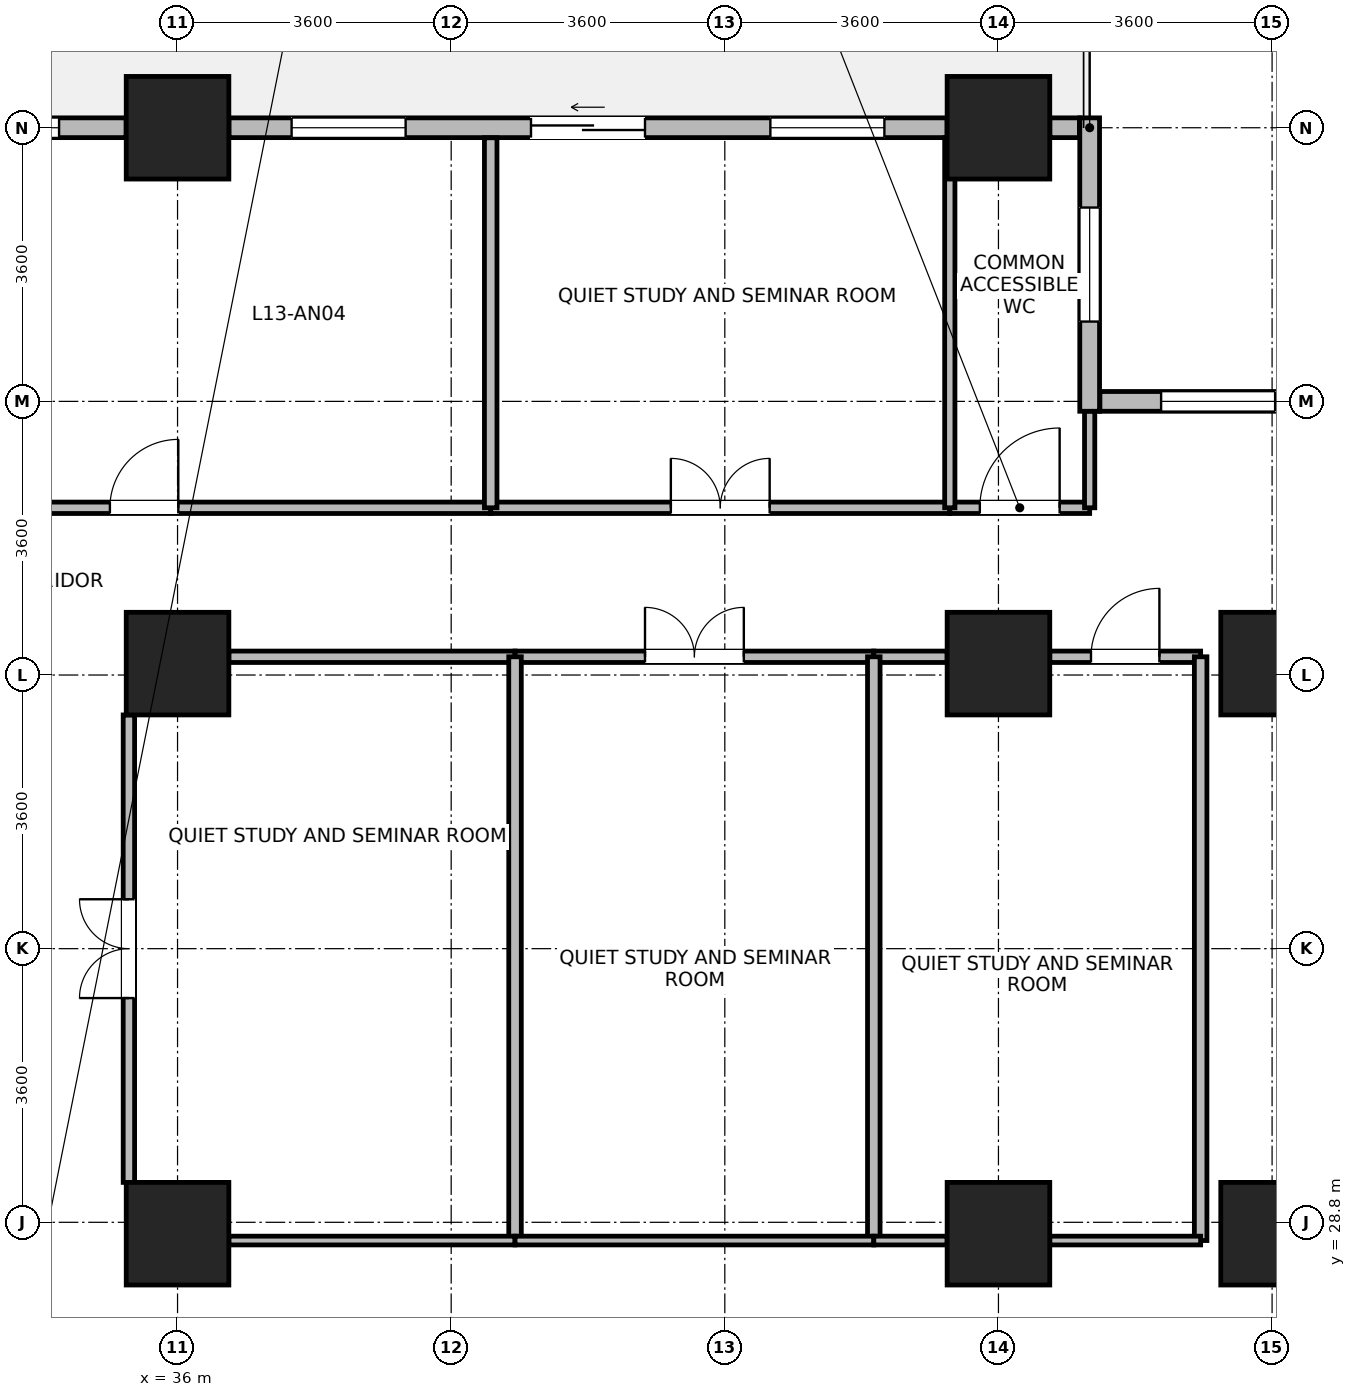
"""IFC4 building model, lengths in metres.
Left out: names, types, materials, properties, quantities, classifications, styles, units other than length and angle.
Written with IfcOpenShell. Run it as: python <this file> out.ifc"""

import sys

from ifc_helpers import new_model, si_unit, direction, frame, frame_2d, origin, origin_2d, place, context, subcontext, project, spatial, rectangle, extrude, source, transform, mapped, element, fill, save


model = new_model("IFC4")
c1 = context("Model", 3, precision=1e-05, world=origin(), true_north=direction((0.0, 1.0)))
c2 = subcontext(c1, "Body", "Model", "MODEL_VIEW")
j1 = project(units=[si_unit("LENGTHUNIT", "METRE"), si_unit("PLANEANGLEUNIT", "RADIAN")], contexts=[c1])
p1 = place(None, origin())
s1 = spatial("IfcSite", under=j1, at=p1, CompositionType="ELEMENT")
p2 = place(p1, origin())
s2 = spatial("IfcBuilding", under=s1, at=p2, CompositionType="ELEMENT")
p3 = place(p2, frame((0.0, 0.0, 54.9)))
s3 = spatial("IfcBuildingStorey", under=s2, at=p3, CompositionType="ELEMENT", Elevation=54.9)
m1 = source(origin(), c2, "Body", "SweptSolid", [
    extrude(rectangle(XDim=1.35, YDim=1.35, at=origin_2d()), origin(), (0.0, 0.0, 1.0), 3.7),
])
for number, where, z_axis, x_axis in (
    (1, (36.0, 43.2, 0.0), (0.0, 0.0, 1.0), (1.0, 0.0, 0.0)),
    (2, (36.0, 28.65, 0.0), (0.0, 0.0, 1.0), (1.0, 0.0, 0.0)),
    (3, (36.0, 36.15, 0.0), (0.0, 0.0, 1.0), (1.0, 0.0, 0.0)),
    (4, (46.8, 28.65, 0.0), (0.0, 0.0, 1.0), (1.0, 0.0, 0.0)),
    (5, (46.8, 36.15, 0.0), (0.0, 0.0, 1.0), (1.0, 0.0, 0.0)),
    (6, (46.8, 43.2, 0.0), (0.0, 0.0, 1.0), (1.0, 0.0, 0.0)),
    (7, (50.4, 28.65, 0.0), (0.0, 0.0, 1.0), (1.0, 0.0, 0.0)),
    (8, (50.4, 36.15, 0.0), (0.0, 0.0, 1.0), (1.0, 0.0, 0.0)),
):
    element("IfcColumn", number, at=place(p3, frame(where, z_axis=z_axis, x_axis=x_axis)), inside=s3, PredefinedType="COLUMN", context=c2, shape_type="MappedRepresentation", body=[
        mapped(m1, transform((0.0, 0.0, 0.0), x_axis=(1.0, 0.0, 0.0), y_axis=(0.0, 1.0, 0.0), z_axis=(0.0, 0.0, 1.0), scale=1.0)),
    ])
p4 = place(p3, frame((48.135, 39.6, 0.0), z_axis=(0.0, 0.0, 1.0), x_axis=(1.0, 0.0, 0.0)))
e9 = element("IfcWall", 9, at=p4, inside=s3, PredefinedType="STANDARD", context=c2, shape_type="SweptSolid", body=[
    extrude(rectangle(XDim=9.33, YDim=0.26, at=frame_2d((4.665, 0.0))), origin(), (0.0, 0.0, 1.0), 3.43),
])
p5 = place(p4, frame((0.805, 0.0, 0.85)))
e10 = element("IfcOpeningElement", 10, at=p5, cuts=e9, PredefinedType="OPENING", context=c2, shape_type="SweptSolid", body=[
    extrude(rectangle(XDim=1.5, YDim=1.85, at=frame_2d((0.75, 0.925))), frame((0.0, 0.14, 0.0), z_axis=(0.0, -1.0, 0.0), x_axis=(1.0, 0.0, 0.0)), (0.0, 0.0, 1.0), 0.28),
])
p6 = place(p4, frame((3.915, 0.0, 0.85)))
e11 = element("IfcOpeningElement", 11, at=p6, cuts=e9, PredefinedType="OPENING", context=c2, shape_type="SweptSolid", body=[
    extrude(rectangle(XDim=1.5, YDim=1.85, at=frame_2d((0.75, 0.925))), frame((0.0, 0.14, 0.0), z_axis=(0.0, -1.0, 0.0), x_axis=(1.0, 0.0, 0.0)), (0.0, 0.0, 1.0), 0.28),
])
p7 = place(p4, frame((7.025, 0.0, 0.85)))
e12 = element("IfcOpeningElement", 12, at=p7, cuts=e9, PredefinedType="OPENING", context=c2, shape_type="SweptSolid", body=[
    extrude(rectangle(XDim=1.5, YDim=1.85, at=frame_2d((0.75, 0.925))), frame((0.0, 0.14, 0.0), z_axis=(0.0, -1.0, 0.0), x_axis=(1.0, 0.0, 0.0)), (0.0, 0.0, 1.0), 0.28),
])
p8 = place(p3, frame((48.0, 43.33, 0.0), z_axis=(0.0, 0.0, 1.0), x_axis=(0.0, -1.0, 0.0)))
e13 = element("IfcWall", 13, at=p8, inside=s3, PredefinedType="STANDARD", context=c2, shape_type="SweptSolid", body=[
    extrude(rectangle(XDim=3.86, YDim=0.26, at=frame_2d((1.93, 0.0))), origin(), (0.0, 0.0, 1.0), 3.43),
])
p9 = place(p8, frame((1.18, 0.0, 0.85)))
e14 = element("IfcOpeningElement", 14, at=p9, cuts=e13, PredefinedType="OPENING", context=c2, shape_type="SweptSolid", body=[
    extrude(rectangle(XDim=1.5, YDim=1.85, at=frame_2d((0.75, 0.925))), frame((0.0, 0.14, 0.0), z_axis=(0.0, -1.0, 0.0), x_axis=(1.0, 0.0, 0.0)), (0.0, 0.0, 1.0), 0.28),
])
p10 = place(p3, frame((47.476, 43.2, 0.0), z_axis=(0.0, 0.0, 1.0), x_axis=(1.0, 0.0, 0.0)))
e15 = element("IfcWall", 15, at=p10, inside=s3, PredefinedType="STANDARD", context=c2, shape_type="SweptSolid", body=[
    extrude(rectangle(XDim=0.389, YDim=0.26, at=frame_2d((0.194, 0.0))), origin(), (0.0, 0.0, 1.0), 3.43),
])
p11 = place(p3, frame((36.676, 43.2, 0.0), z_axis=(0.0, 0.0, 1.0), x_axis=(1.0, 0.0, 0.0)))
e16 = element("IfcWall", 16, at=p11, inside=s3, PredefinedType="STANDARD", context=c2, shape_type="SweptSolid", body=[
    extrude(rectangle(XDim=9.448, YDim=0.26, at=frame_2d((4.724, 0.0))), origin(), (0.0, 0.0, 1.0), 2.93),
])
p12 = place(p11, frame((3.974, 0.0, 0.0)))
e17 = element("IfcOpeningElement", 17, at=p12, cuts=e16, PredefinedType="OPENING", context=c2, shape_type="SweptSolid", body=[
    extrude(rectangle(XDim=1.5, YDim=2.15, at=frame_2d((0.75, 1.075))), frame((0.0, 0.14, 0.0), z_axis=(0.0, -1.0, 0.0), x_axis=(1.0, 0.0, 0.0)), (0.0, 0.0, 1.0), 0.28),
])
p13 = place(p11, frame((0.825, 0.0, 0.85)))
e18 = element("IfcOpeningElement", 18, at=p13, cuts=e16, PredefinedType="OPENING", context=c2, shape_type="SweptSolid", body=[
    extrude(rectangle(XDim=1.5, YDim=1.85, at=frame_2d((0.75, 0.925))), frame((0.0, 0.14, 0.0), z_axis=(0.0, -1.0, 0.0), x_axis=(1.0, 0.0, 0.0)), (0.0, 0.0, 1.0), 0.28),
])
p14 = place(p11, frame((7.123, 0.0, 0.85)))
e19 = element("IfcOpeningElement", 19, at=p14, cuts=e16, PredefinedType="OPENING", context=c2, shape_type="SweptSolid", body=[
    extrude(rectangle(XDim=1.5, YDim=1.85, at=frame_2d((0.75, 0.925))), frame((0.0, 0.14, 0.0), z_axis=(0.0, -1.0, 0.0), x_axis=(1.0, 0.0, 0.0)), (0.0, 0.0, 1.0), 0.28),
])
p15 = place(p3, frame((32.609, 43.2, 0.0), z_axis=(0.0, 0.0, 1.0), x_axis=(1.0, 0.0, 0.0)))
e20 = element("IfcWall", 20, at=p15, inside=s3, PredefinedType="STANDARD", context=c2, shape_type="SweptSolid", body=[
    extrude(rectangle(XDim=2.715, YDim=0.26, at=frame_2d((1.357, 0.0))), origin(), (0.0, 0.0, 1.0), 2.93),
])
p16 = place(p15, frame((0.883, 0.0, 0.85)))
e21 = element("IfcOpeningElement", 21, at=p16, cuts=e20, PredefinedType="OPENING", context=c2, shape_type="SweptSolid", body=[
    extrude(rectangle(XDim=0.95, YDim=1.75, at=frame_2d((0.475, 0.875))), frame((0.0, 0.14, 0.0), z_axis=(0.0, -1.0, 0.0), x_axis=(1.0, 0.0, 0.0)), (0.0, 0.0, 1.0), 0.28),
])
p17 = place(p3, frame((31.0, 38.2, 0.0), z_axis=(0.0, 0.0, 1.0), x_axis=(1.0, 0.0, 0.0)))
e22 = element("IfcWall", 22, at=p17, inside=s3, PredefinedType="PARTITIONING", context=c2, shape_type="SweptSolid", body=[
    extrude(rectangle(XDim=9.12, YDim=0.15, at=frame_2d((4.56, 0.0))), origin(), (0.0, 0.0, 1.0), 3.43),
])
p18 = place(p17, frame((4.11, 0.0, 0.0)))
e23 = element("IfcOpeningElement", 23, at=p18, cuts=e22, PredefinedType="OPENING", context=c2, shape_type="SweptSolid", body=[
    extrude(rectangle(XDim=0.9, YDim=2.08, at=frame_2d((0.45, 1.04))), frame((0.0, 0.085, 0.0), z_axis=(0.0, -1.0, 0.0), x_axis=(1.0, 0.0, 0.0)), (0.0, 0.0, 1.0), 0.17),
])
p19 = place(p3, frame((35.36, 29.325, 0.0), z_axis=(0.0, 0.0, 1.0), x_axis=(0.0, 1.0, 0.0)))
e24 = element("IfcWall", 24, at=p19, inside=s3, PredefinedType="PARTITIONING", context=c2, shape_type="SweptSolid", body=[
    extrude(rectangle(XDim=6.15, YDim=0.15, at=frame_2d((3.075, 0.0))), origin(), (0.0, 0.0, 1.0), 3.43),
])
p20 = place(p19, frame((2.425, 0.0, 0.0)))
e25 = element("IfcOpeningElement", 25, at=p20, cuts=e24, PredefinedType="OPENING", context=c2, shape_type="SweptSolid", body=[
    extrude(rectangle(XDim=1.3, YDim=2.12, at=frame_2d((0.65, 1.06))), frame((0.0, 0.085, 0.0), z_axis=(0.0, -1.0, 0.0), x_axis=(1.0, 0.0, 0.0)), (0.0, 0.0, 1.0), 0.17),
])
p21 = place(p3, frame((40.12, 38.2, 0.0), z_axis=(0.0, 0.0, 1.0), x_axis=(1.0, 0.0, 0.0)))
e26 = element("IfcWall", 26, at=p21, inside=s3, PredefinedType="PARTITIONING", context=c2, shape_type="SweptSolid", body=[
    extrude(rectangle(XDim=6.04, YDim=0.15, at=frame_2d((3.02, 0.0))), origin(), (0.0, 0.0, 1.0), 3.43),
])
p22 = place(p21, frame((2.37, 0.0, 0.0)))
e27 = element("IfcOpeningElement", 27, at=p22, cuts=e26, PredefinedType="OPENING", context=c2, shape_type="SweptSolid", body=[
    extrude(rectangle(XDim=1.3, YDim=2.12, at=frame_2d((0.65, 1.06))), frame((0.0, 0.085, 0.0), z_axis=(0.0, -1.0, 0.0), x_axis=(1.0, 0.0, 0.0)), (0.0, 0.0, 1.0), 0.17),
])
p23 = place(p3, frame((36.675, 36.24, 0.0), z_axis=(0.0, 0.0, 1.0), x_axis=(1.0, 0.0, 0.0)))
e28 = element("IfcWall", 28, at=p23, inside=s3, PredefinedType="PARTITIONING", context=c2, shape_type="SweptSolid", body=[
    extrude(rectangle(XDim=3.765, YDim=0.15, at=frame_2d((1.882, 0.0))), origin(), (0.0, 0.0, 1.0), 2.78),
])
p24 = place(p3, frame((40.44, 36.24, 0.0), z_axis=(0.0, 0.0, 1.0), x_axis=(1.0, 0.0, 0.0)))
e29 = element("IfcWall", 29, at=p24, inside=s3, PredefinedType="PARTITIONING", context=c2, shape_type="SweptSolid", body=[
    extrude(rectangle(XDim=4.72, YDim=0.15, at=frame_2d((2.36, 0.0))), origin(), (0.0, 0.0, 1.0), 2.78),
])
p25 = place(p24, frame((1.71, 0.0, 0.0)))
e30 = element("IfcOpeningElement", 30, at=p25, cuts=e29, PredefinedType="OPENING", context=c2, shape_type="SweptSolid", body=[
    extrude(rectangle(XDim=1.3, YDim=2.12, at=frame_2d((0.65, 1.06))), frame((0.0, 0.085, 0.0), z_axis=(0.0, -1.0, 0.0), x_axis=(1.0, 0.0, 0.0)), (0.0, 0.0, 1.0), 0.17),
])
p26 = place(p3, frame((45.16, 36.24, 0.0), z_axis=(0.0, 0.0, 1.0), x_axis=(1.0, 0.0, 0.0)))
e31 = element("IfcWall", 31, at=p26, inside=s3, PredefinedType="PARTITIONING", context=c2, shape_type="SweptSolid", body=[
    extrude(rectangle(XDim=0.965, YDim=0.15, at=frame_2d((0.482, 0.0))), origin(), (0.0, 0.0, 1.0), 2.78),
])
p27 = place(p3, frame((47.475, 36.24, 0.0), z_axis=(0.0, 0.0, 1.0), x_axis=(1.0, 0.0, 0.0)))
e32 = element("IfcWall", 32, at=p27, inside=s3, PredefinedType="PARTITIONING", context=c2, shape_type="SweptSolid", body=[
    extrude(rectangle(XDim=1.985, YDim=0.15, at=frame_2d((0.992, 0.0))), origin(), (0.0, 0.0, 1.0), 2.78),
])
p28 = place(p27, frame((0.542, 0.0, 0.0)))
e33 = element("IfcOpeningElement", 33, at=p28, cuts=e32, PredefinedType="OPENING", context=c2, shape_type="SweptSolid", body=[
    extrude(rectangle(XDim=0.9, YDim=2.08, at=frame_2d((0.45, 1.04))), frame((0.0, 0.085, 0.0), z_axis=(0.0, -1.0, 0.0), x_axis=(1.0, 0.0, 0.0)), (0.0, 0.0, 1.0), 0.17),
])
p29 = place(p3, frame((46.16, 38.2, 0.0), z_axis=(0.0, 0.0, 1.0), x_axis=(1.0, 0.0, 0.0)))
e34 = element("IfcWall", 34, at=p29, inside=s3, PredefinedType="PARTITIONING", context=c2, shape_type="SweptSolid", body=[
    extrude(rectangle(XDim=1.84, YDim=0.15, at=frame_2d((0.92, 0.0))), origin(), (0.0, 0.0, 1.0), 3.43),
])
p30 = place(p29, frame((0.395, 0.0, 0.0)))
e35 = element("IfcOpeningElement", 35, at=p30, cuts=e34, PredefinedType="OPENING", context=c2, shape_type="SweptSolid", body=[
    extrude(rectangle(XDim=1.05, YDim=2.12, at=frame_2d((0.525, 1.06))), frame((0.0, 0.085, 0.0), z_axis=(0.0, -1.0, 0.0), x_axis=(1.0, 0.0, 0.0)), (0.0, 0.0, 1.0), 0.17),
])
for number, where, z_axis, x_axis in (
    (36, (40.44, 28.56, 0.0), (0.0, 0.0, 1.0), (0.0, 1.0, 0.0)),
    (37, (45.16, 28.56, 0.0), (0.0, 0.0, 1.0), (0.0, 1.0, 0.0)),
    (38, (49.46, 28.56, 0.0), (0.0, 0.0, 1.0), (0.0, 1.0, 0.0)),
):
    element("IfcWall", number, at=place(p3, frame(where, z_axis=z_axis, x_axis=x_axis)), inside=s3, PredefinedType="PARTITIONING", context=c2, shape_type="SweptSolid", body=[
        extrude(rectangle(XDim=7.68, YDim=0.165, at=frame_2d((3.84, 0.0))), origin(), (0.0, 0.0, 1.0), 3.43),
    ])
p31 = place(p3, frame((36.675, 28.56, 0.0), z_axis=(0.0, 0.0, 1.0), x_axis=(1.0, 0.0, 0.0)))
e39 = element("IfcWall", 39, at=p31, inside=s3, PredefinedType="PARTITIONING", context=c2, shape_type="SweptSolid", body=[
    extrude(rectangle(XDim=3.765, YDim=0.115, at=frame_2d((1.882, 0.0))), origin(), (0.0, 0.0, 1.0), 2.78),
])
p32 = place(p3, frame((40.12, 38.2, 0.0), z_axis=(0.0, 0.0, 1.0), x_axis=(0.0, 1.0, 0.0)))
e40 = element("IfcWall", 40, at=p32, inside=s3, PredefinedType="PARTITIONING", context=c2, shape_type="SweptSolid", body=[
    extrude(rectangle(XDim=4.868, YDim=0.165, at=frame_2d((2.434, 0.0))), origin(), (0.0, 0.0, 1.0), 3.43),
])
p33 = place(p3, frame((46.16, 38.2, 0.0), z_axis=(0.0, 0.0, 1.0), x_axis=(0.0, 1.0, 0.0)))
e41 = element("IfcWall", 41, at=p33, inside=s3, PredefinedType="PARTITIONING", context=c2, shape_type="SweptSolid", body=[
    extrude(rectangle(XDim=4.868, YDim=0.135, at=frame_2d((2.434, 0.0))), origin(), (0.0, 0.0, 1.0), 3.43),
])
p34 = place(p3, frame((48.0, 38.2, 0.0), z_axis=(0.0, 0.0, 1.0), x_axis=(0.0, 1.0, 0.0)))
e42 = element("IfcWall", 42, at=p34, inside=s3, PredefinedType="PARTITIONING", context=c2, shape_type="SweptSolid", body=[
    extrude(rectangle(XDim=1.268, YDim=0.135, at=frame_2d((0.634, 0.0))), origin(), (0.0, 0.0, 1.0), 3.43),
])
p35 = place(p3, frame((40.44, 28.56, 0.0), z_axis=(0.0, 0.0, 1.0), x_axis=(1.0, 0.0, 0.0)))
e43 = element("IfcWall", 43, at=p35, inside=s3, PredefinedType="PARTITIONING", context=c2, shape_type="SweptSolid", body=[
    extrude(rectangle(XDim=4.72, YDim=0.115, at=frame_2d((2.36, 0.0))), origin(), (0.0, 0.0, 1.0), 2.78),
])
p36 = place(p3, frame((45.16, 28.56, 0.0), z_axis=(0.0, 0.0, 1.0), x_axis=(1.0, 0.0, 0.0)))
e44 = element("IfcWall", 44, at=p36, inside=s3, PredefinedType="PARTITIONING", context=c2, shape_type="SweptSolid", body=[
    extrude(rectangle(XDim=0.965, YDim=0.115, at=frame_2d((0.482, 0.0))), origin(), (0.0, 0.0, 1.0), 2.78),
])
p37 = place(p3, frame((47.475, 28.56, 0.0), z_axis=(0.0, 0.0, 1.0), x_axis=(1.0, 0.0, 0.0)))
e45 = element("IfcWall", 45, at=p37, inside=s3, PredefinedType="PARTITIONING", context=c2, shape_type="SweptSolid", body=[
    extrude(rectangle(XDim=1.985, YDim=0.115, at=frame_2d((0.992, 0.0))), origin(), (0.0, 0.0, 1.0), 2.78),
])
p38 = place(p5, origin())
e46 = element("IfcWindow", 46, at=p38, inside=s3, PartitioningType="SINGLE_PANEL", PredefinedType="WINDOW", context=c2, shape_type="SweptSolid", body=[
    extrude(rectangle(XDim=1.5, YDim=1.85, at=frame_2d((0.75, 0.925))), frame((0.0, 0.03, 0.0), z_axis=(0.0, -1.0, 0.0), x_axis=(1.0, 0.0, 0.0)), (0.0, 0.0, 1.0), 0.06),
])
fill(e10, e46)
p39 = place(p9, origin())
e47 = element("IfcWindow", 47, at=p39, inside=s3, PartitioningType="SINGLE_PANEL", PredefinedType="WINDOW", context=c2, shape_type="SweptSolid", body=[
    extrude(rectangle(XDim=1.5, YDim=1.85, at=frame_2d((0.75, 0.925))), frame((0.0, 0.03, 0.0), z_axis=(0.0, -1.0, 0.0), x_axis=(1.0, 0.0, 0.0)), (0.0, 0.0, 1.0), 0.06),
])
fill(e14, e47)
p40 = place(p12, origin())
e48 = element("IfcDoor", 48, at=p40, inside=s3, OperationType="SLIDING_TO_LEFT", PredefinedType="DOOR", context=c2, shape_type="SweptSolid", body=[
    extrude(rectangle(XDim=1.5, YDim=2.15, at=frame_2d((0.75, 1.075))), frame((0.0, 0.025, 0.0), z_axis=(0.0, -1.0, 0.0), x_axis=(1.0, 0.0, 0.0)), (0.0, 0.0, 1.0), 0.05),
])
fill(e17, e48)
p41 = place(p13, origin())
e49 = element("IfcWindow", 49, at=p41, inside=s3, PartitioningType="SINGLE_PANEL", PredefinedType="WINDOW", context=c2, shape_type="SweptSolid", body=[
    extrude(rectangle(XDim=1.5, YDim=1.85, at=frame_2d((0.75, 0.925))), frame((0.0, 0.03, 0.0), z_axis=(0.0, -1.0, 0.0), x_axis=(1.0, 0.0, 0.0)), (0.0, 0.0, 1.0), 0.06),
])
fill(e18, e49)
p42 = place(p14, origin())
e50 = element("IfcWindow", 50, at=p42, inside=s3, PartitioningType="SINGLE_PANEL", PredefinedType="WINDOW", context=c2, shape_type="SweptSolid", body=[
    extrude(rectangle(XDim=1.5, YDim=1.85, at=frame_2d((0.75, 0.925))), frame((0.0, 0.03, 0.0), z_axis=(0.0, -1.0, 0.0), x_axis=(1.0, 0.0, 0.0)), (0.0, 0.0, 1.0), 0.06),
])
fill(e19, e50)
p43 = place(p16, origin())
e51 = element("IfcWindow", 51, at=p43, inside=s3, PartitioningType="SINGLE_PANEL", PredefinedType="WINDOW", context=c2, shape_type="SweptSolid", body=[
    extrude(rectangle(XDim=0.95, YDim=1.75, at=frame_2d((0.475, 0.875))), frame((0.0, 0.03, 0.0), z_axis=(0.0, -1.0, 0.0), x_axis=(1.0, 0.0, 0.0)), (0.0, 0.0, 1.0), 0.06),
])
fill(e21, e51)
p44 = place(p18, origin())
e52 = element("IfcDoor", 52, at=p44, inside=s3, OperationType="SINGLE_SWING_RIGHT", PredefinedType="DOOR", context=c2, shape_type="SweptSolid", body=[
    extrude(rectangle(XDim=0.9, YDim=2.08, at=frame_2d((0.45, 1.04))), frame((0.0, 0.025, 0.0), z_axis=(0.0, -1.0, 0.0), x_axis=(1.0, 0.0, 0.0)), (0.0, 0.0, 1.0), 0.05),
])
fill(e23, e52)
p45 = place(p20, origin())
e53 = element("IfcDoor", 53, at=p45, inside=s3, OperationType="DOUBLE_DOOR_SINGLE_SWING", PredefinedType="DOOR", context=c2, shape_type="SweptSolid", body=[
    extrude(rectangle(XDim=1.3, YDim=2.12, at=frame_2d((0.65, 1.06))), frame((0.0, 0.025, 0.0), z_axis=(0.0, -1.0, 0.0), x_axis=(1.0, 0.0, 0.0)), (0.0, 0.0, 1.0), 0.05),
])
fill(e25, e53)
p46 = place(p22, origin())
e54 = element("IfcDoor", 54, at=p46, inside=s3, OperationType="DOUBLE_DOOR_SINGLE_SWING", PredefinedType="DOOR", context=c2, shape_type="SweptSolid", body=[
    extrude(rectangle(XDim=1.3, YDim=2.12, at=frame_2d((0.65, 1.06))), frame((0.0, 0.025, 0.0), z_axis=(0.0, -1.0, 0.0), x_axis=(1.0, 0.0, 0.0)), (0.0, 0.0, 1.0), 0.05),
])
fill(e27, e54)
p47 = place(p25, origin())
e55 = element("IfcDoor", 55, at=p47, inside=s3, OperationType="DOUBLE_DOOR_SINGLE_SWING", PredefinedType="DOOR", context=c2, shape_type="SweptSolid", body=[
    extrude(rectangle(XDim=1.3, YDim=2.12, at=frame_2d((0.65, 1.06))), frame((0.0, 0.025, 0.0), z_axis=(0.0, -1.0, 0.0), x_axis=(1.0, 0.0, 0.0)), (0.0, 0.0, 1.0), 0.05),
])
fill(e30, e55)
p48 = place(p28, origin())
e56 = element("IfcDoor", 56, at=p48, inside=s3, OperationType="SINGLE_SWING_RIGHT", PredefinedType="DOOR", context=c2, shape_type="SweptSolid", body=[
    extrude(rectangle(XDim=0.9, YDim=2.08, at=frame_2d((0.45, 1.04))), frame((0.0, 0.025, 0.0), z_axis=(0.0, -1.0, 0.0), x_axis=(1.0, 0.0, 0.0)), (0.0, 0.0, 1.0), 0.05),
])
fill(e33, e56)
p49 = place(p30, origin())
e57 = element("IfcDoor", 57, at=p49, inside=s3, OperationType="SINGLE_SWING_RIGHT", PredefinedType="DOOR", context=c2, shape_type="SweptSolid", body=[
    extrude(rectangle(XDim=1.05, YDim=2.12, at=frame_2d((0.525, 1.06))), frame((0.0, 0.025, 0.0), z_axis=(0.0, -1.0, 0.0), x_axis=(1.0, 0.0, 0.0)), (0.0, 0.0, 1.0), 0.05),
])
fill(e35, e57)
save(model, sys.argv[1])
